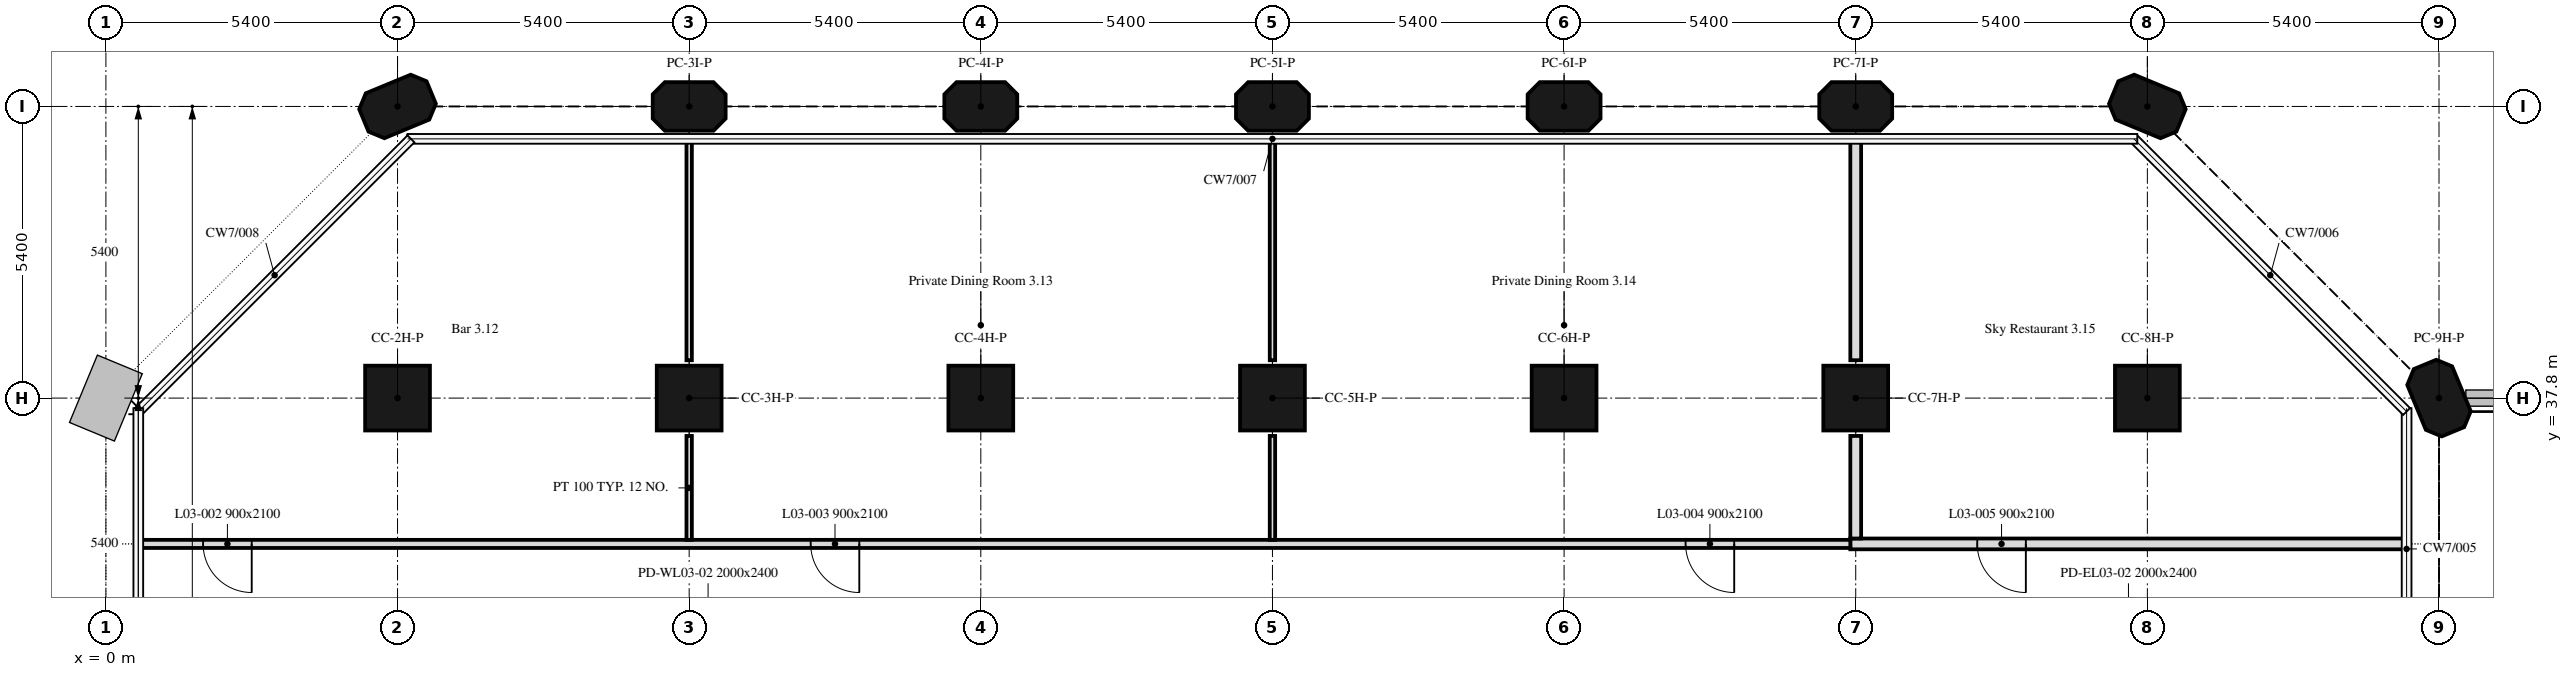
"""IFC4 building model, lengths in metres.
Left out: names, types, materials, properties, quantities, classifications, styles, units other than length and angle.
Written with IfcOpenShell. Run it as: python <this file> out.ifc"""

import sys

from ifc_helpers import new_model, si_unit, direction, frame, frame_2d, origin, origin_2d, place, context, subcontext, project, spatial, polyline, rectangle, outline, extrude, element, fill, save


model = new_model("IFC4")
c1 = context("Model", 3, precision=1e-05, world=origin(), true_north=direction((0.0, 1.0)))
c2 = subcontext(c1, "Body", "Model", "MODEL_VIEW")
j1 = project(units=[si_unit("LENGTHUNIT", "METRE"), si_unit("PLANEANGLEUNIT", "RADIAN")], contexts=[c1])
p1 = place(None, origin())
s1 = spatial("IfcSite", under=j1, at=p1, CompositionType="ELEMENT")
p2 = place(p1, origin())
s2 = spatial("IfcBuilding", under=s1, at=p2, CompositionType="ELEMENT")
p3 = place(p2, frame((0.0, 0.0, 19.8)))
s3 = spatial("IfcBuildingStorey", under=s2, at=p3, CompositionType="ELEMENT", Elevation=19.8)
for number, where, z_axis, x_axis in (
    (1, (5.4, 37.8, 0.0), (0.0, 0.0, 1.0), (1.0, 0.0, 0.0)),
    (2, (10.8, 37.8, 0.0), (0.0, 0.0, 1.0), (1.0, 0.0, 0.0)),
    (3, (16.2, 37.8, 0.0), (0.0, 0.0, 1.0), (1.0, 0.0, 0.0)),
    (4, (21.6, 37.8, 0.0), (0.0, 0.0, 1.0), (1.0, 0.0, 0.0)),
    (5, (27.0, 37.8, 0.0), (0.0, 0.0, 1.0), (1.0, 0.0, 0.0)),
    (6, (32.4, 37.8, 0.0), (0.0, 0.0, 1.0), (1.0, 0.0, 0.0)),
    (7, (37.8, 37.8, 0.0), (0.0, 0.0, 1.0), (1.0, 0.0, 0.0)),
):
    element("IfcColumn", number, at=place(p3, frame(where, z_axis=z_axis, x_axis=x_axis)), inside=s3, PredefinedType="COLUMN", context=c2, shape_type="SweptSolid", body=[
        extrude(rectangle(XDim=1.2, YDim=1.2, at=origin_2d()), origin(), (0.0, 0.0, 1.0), 4.4),
    ])
for number, where, z_axis, x_axis in (
    (8, (43.2, 37.8, 0.0), (0.0, 0.0, 1.0), (-0.383, 0.924, 0.0)),
    (9, (5.4, 43.2, 0.0), (0.0, 0.0, 1.0), (0.924, 0.383, 0.0)),
    (10, (10.8, 43.2, 0.0), (0.0, 0.0, 1.0), (1.0, 0.0, 0.0)),
    (11, (16.2, 43.2, 0.0), (0.0, 0.0, 1.0), (1.0, 0.0, 0.0)),
    (12, (21.6, 43.2, 0.0), (0.0, 0.0, 1.0), (1.0, 0.0, 0.0)),
    (13, (27.0, 43.2, 0.0), (0.0, 0.0, 1.0), (1.0, 0.0, 0.0)),
    (14, (32.4, 43.2, 0.0), (0.0, 0.0, 1.0), (1.0, 0.0, 0.0)),
    (15, (37.8, 43.2, 0.0), (0.0, 0.0, 1.0), (-0.924, 0.383, 0.0)),
):
    element("IfcColumn", number, at=place(p3, frame(where, z_axis=z_axis, x_axis=x_axis)), inside=s3, PredefinedType="COLUMN", context=c2, shape_type="SweptSolid", body=[
        extrude(outline(polyline([(-0.45, -0.45), (0.45, -0.45), (0.675, -0.225), (0.675, 0.225), (0.45, 0.45), (-0.45, 0.45), (-0.675, 0.225), (-0.675, -0.225), (-0.45, -0.45)])), origin(), (0.0, 0.0, 1.0), 4.4),
    ])
p4 = place(p3, frame((42.6, 35.1, 0.0), z_axis=(0.0, 0.0, 1.0), x_axis=(-1.0, 0.0, 0.0)))
e16 = element("IfcWall", 16, at=p4, inside=s3, PredefinedType="PARTITIONING", context=c2, shape_type="SweptSolid", body=[
    extrude(rectangle(XDim=10.3, YDim=0.2, at=frame_2d((5.15, 0.0))), origin(), (0.0, 0.0, 1.0), 3.65),
])
p5 = place(p4, frame((7.05, 0.0, 0.0)))
e17 = element("IfcOpeningElement", 17, at=p5, cuts=e16, PredefinedType="OPENING", context=c2, shape_type="SweptSolid", body=[
    extrude(rectangle(XDim=0.9, YDim=2.1, at=frame_2d((0.45, 1.05))), frame((0.0, 0.1, 0.0), z_axis=(0.0, -1.0, 0.0), x_axis=(1.0, 0.0, 0.0)), (0.0, 0.0, 1.0), 0.2),
])
p6 = place(p3, frame((32.3, 35.1, 0.0), z_axis=(0.0, 0.0, 1.0), x_axis=(-1.0, 0.0, 0.0)))
e18 = element("IfcWall", 18, at=p6, inside=s3, PredefinedType="PARTITIONING", context=c2, shape_type="SweptSolid", body=[
    extrude(rectangle(XDim=31.7, YDim=0.15, at=frame_2d((15.85, 0.0))), origin(), (0.0, 0.0, 1.0), 3.65),
])
p7 = place(p6, frame((29.6, 0.0, 0.0)))
e19 = element("IfcOpeningElement", 19, at=p7, cuts=e18, PredefinedType="OPENING", context=c2, shape_type="SweptSolid", body=[
    extrude(rectangle(XDim=0.9, YDim=2.1, at=frame_2d((0.45, 1.05))), frame((0.0, 0.075, 0.0), z_axis=(0.0, -1.0, 0.0), x_axis=(1.0, 0.0, 0.0)), (0.0, 0.0, 1.0), 0.15),
])
p8 = place(p6, frame((18.35, 0.0, 0.0)))
e20 = element("IfcOpeningElement", 20, at=p8, cuts=e18, PredefinedType="OPENING", context=c2, shape_type="SweptSolid", body=[
    extrude(rectangle(XDim=0.9, YDim=2.1, at=frame_2d((0.45, 1.05))), frame((0.0, 0.075, 0.0), z_axis=(0.0, -1.0, 0.0), x_axis=(1.0, 0.0, 0.0)), (0.0, 0.0, 1.0), 0.15),
])
p9 = place(p6, frame((2.15, 0.0, 0.0)))
e21 = element("IfcOpeningElement", 21, at=p9, cuts=e18, PredefinedType="OPENING", context=c2, shape_type="SweptSolid", body=[
    extrude(rectangle(XDim=0.9, YDim=2.1, at=frame_2d((0.45, 1.05))), frame((0.0, 0.075, 0.0), z_axis=(0.0, -1.0, 0.0), x_axis=(1.0, 0.0, 0.0)), (0.0, 0.0, 1.0), 0.15),
])
p10 = place(p3, frame((10.8, 35.175, 0.0), z_axis=(0.0, 0.0, 1.0), x_axis=(0.0, 1.0, 0.0)))
e22 = element("IfcWall", 22, at=p10, inside=s3, PredefinedType="PARTITIONING", context=c2, shape_type="SweptSolid", body=[
    extrude(rectangle(XDim=1.924, YDim=0.1, at=frame_2d((0.962, 0.0))), origin(), (0.0, 0.0, 1.0), 3.65),
])
p11 = place(p3, frame((10.8, 38.501, 0.0), z_axis=(0.0, 0.0, 1.0), x_axis=(0.0, 1.0, 0.0)))
e23 = element("IfcWall", 23, at=p11, inside=s3, PredefinedType="PARTITIONING", context=c2, shape_type="SweptSolid", body=[
    extrude(rectangle(XDim=4.099, YDim=0.1, at=frame_2d((2.05, 0.0))), origin(), (0.0, 0.0, 1.0), 3.65),
])
p12 = place(p3, frame((21.6, 35.175, 0.0), z_axis=(0.0, 0.0, 1.0), x_axis=(0.0, 1.0, 0.0)))
e24 = element("IfcWall", 24, at=p12, inside=s3, PredefinedType="PARTITIONING", context=c2, shape_type="SweptSolid", body=[
    extrude(rectangle(XDim=1.924, YDim=0.1, at=frame_2d((0.962, 0.0))), origin(), (0.0, 0.0, 1.0), 3.65),
])
p13 = place(p3, frame((21.6, 38.501, 0.0), z_axis=(0.0, 0.0, 1.0), x_axis=(0.0, 1.0, 0.0)))
e25 = element("IfcWall", 25, at=p13, inside=s3, PredefinedType="PARTITIONING", context=c2, shape_type="SweptSolid", body=[
    extrude(rectangle(XDim=4.099, YDim=0.1, at=frame_2d((2.05, 0.0))), origin(), (0.0, 0.0, 1.0), 3.65),
])
p14 = place(p3, frame((32.4, 35.2, 0.0), z_axis=(0.0, 0.0, 1.0), x_axis=(0.0, 1.0, 0.0)))
e26 = element("IfcWall", 26, at=p14, inside=s3, PredefinedType="PARTITIONING", context=c2, shape_type="SweptSolid", body=[
    extrude(rectangle(XDim=1.899, YDim=0.2, at=frame_2d((0.95, 0.0))), origin(), (0.0, 0.0, 1.0), 3.65),
])
p15 = place(p3, frame((32.4, 38.501, 0.0), z_axis=(0.0, 0.0, 1.0), x_axis=(0.0, 1.0, 0.0)))
e27 = element("IfcWall", 27, at=p15, inside=s3, PredefinedType="PARTITIONING", context=c2, shape_type="SweptSolid", body=[
    extrude(rectangle(XDim=4.099, YDim=0.2, at=frame_2d((2.05, 0.0))), origin(), (0.0, 0.0, 1.0), 3.65),
])
p16 = place(p7, origin())
e28 = element("IfcDoor", 28, at=p16, inside=s3, OperationType="SINGLE_SWING_RIGHT", PredefinedType="DOOR", context=c2, shape_type="SweptSolid", body=[
    extrude(rectangle(XDim=0.9, YDim=2.1, at=frame_2d((0.45, 1.05))), frame((0.0, 0.025, 0.0), z_axis=(0.0, -1.0, 0.0), x_axis=(1.0, 0.0, 0.0)), (0.0, 0.0, 1.0), 0.05),
])
fill(e19, e28)
p17 = place(p8, origin())
e29 = element("IfcDoor", 29, at=p17, inside=s3, OperationType="SINGLE_SWING_RIGHT", PredefinedType="DOOR", context=c2, shape_type="SweptSolid", body=[
    extrude(rectangle(XDim=0.9, YDim=2.1, at=frame_2d((0.45, 1.05))), frame((0.0, 0.025, 0.0), z_axis=(0.0, -1.0, 0.0), x_axis=(1.0, 0.0, 0.0)), (0.0, 0.0, 1.0), 0.05),
])
fill(e20, e29)
p18 = place(p9, origin())
e30 = element("IfcDoor", 30, at=p18, inside=s3, OperationType="SINGLE_SWING_RIGHT", PredefinedType="DOOR", context=c2, shape_type="SweptSolid", body=[
    extrude(rectangle(XDim=0.9, YDim=2.1, at=frame_2d((0.45, 1.05))), frame((0.0, 0.025, 0.0), z_axis=(0.0, -1.0, 0.0), x_axis=(1.0, 0.0, 0.0)), (0.0, 0.0, 1.0), 0.05),
])
fill(e21, e30)
p19 = place(p5, origin())
e31 = element("IfcDoor", 31, at=p19, inside=s3, OperationType="SINGLE_SWING_LEFT", PredefinedType="DOOR", context=c2, shape_type="SweptSolid", body=[
    extrude(rectangle(XDim=0.9, YDim=2.1, at=frame_2d((0.45, 1.05))), frame((0.0, 0.025, 0.0), z_axis=(0.0, -1.0, 0.0), x_axis=(1.0, 0.0, 0.0)), (0.0, 0.0, 1.0), 0.05),
])
fill(e17, e31)
save(model, sys.argv[1])
